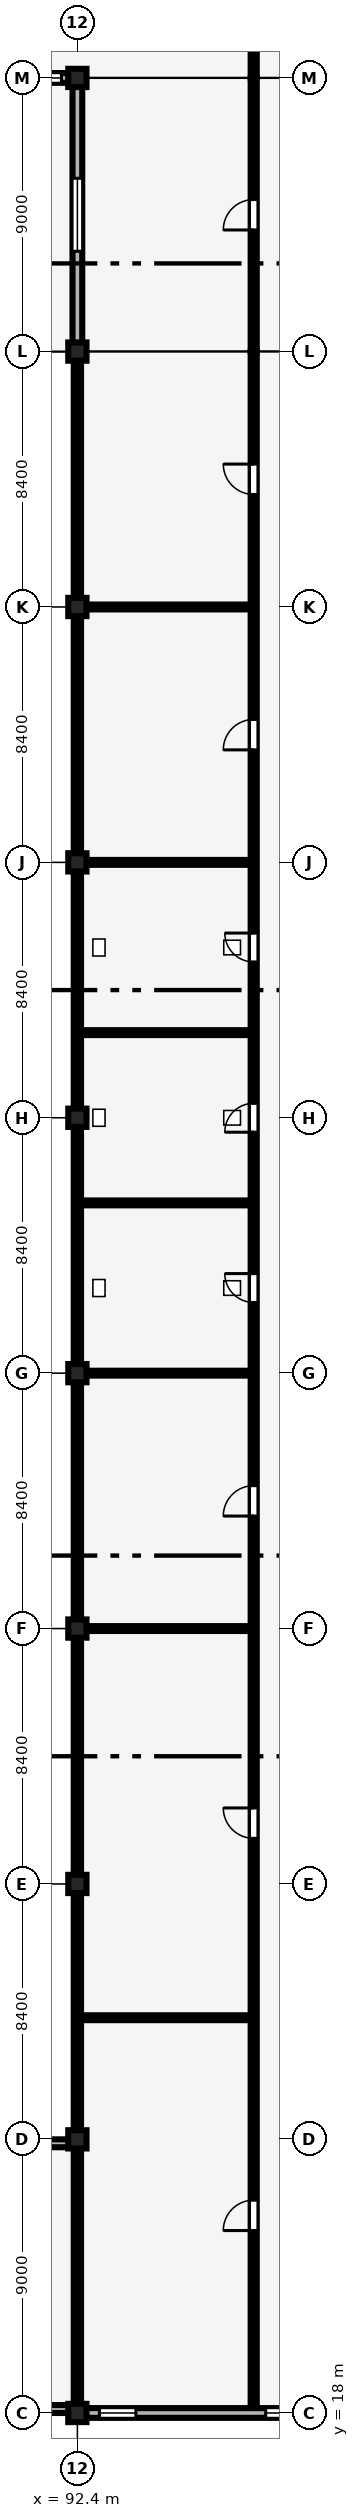
"""IFC4 building model, lengths in metres.
Left out: names, types, materials, properties, quantities, classifications, styles, units other than length and angle.
Written with IfcOpenShell. Run it as: python <this file> out.ifc"""

import sys

from ifc_helpers import new_model, si_unit, direction, frame, frame_2d, origin, origin_2d, place, context, subcontext, project, spatial, rectangle, extrude, element, fill, save


model = new_model("IFC4")
c1 = context("Model", 3, precision=1e-05, world=origin(), true_north=direction((0.0, 1.0)))
c2 = subcontext(c1, "Body", "Model", "MODEL_VIEW")
j1 = project(units=[si_unit("LENGTHUNIT", "METRE"), si_unit("PLANEANGLEUNIT", "RADIAN")], contexts=[c1])
p1 = place(None, origin())
s1 = spatial("IfcSite", under=j1, at=p1, CompositionType="ELEMENT")
p2 = place(p1, origin())
s2 = spatial("IfcBuilding", under=s1, at=p2, CompositionType="ELEMENT")
p3 = place(p2, frame((0.0, 0.0, 9.0)))
s3 = spatial("IfcBuildingStorey", under=s2, at=p3, CompositionType="ELEMENT", Elevation=9.0)
for number, where, z_axis, x_axis in (
    (1, (92.4, 18.0, 0.0), (0.0, 0.0, 1.0), (1.0, 0.0, 0.0)),
    (2, (92.4, 27.0, 0.0), (0.0, 0.0, 1.0), (1.0, 0.0, 0.0)),
    (3, (92.4, 35.4, 0.0), (0.0, 0.0, 1.0), (1.0, 0.0, 0.0)),
    (4, (92.4, 43.8, 0.0), (0.0, 0.0, 1.0), (1.0, 0.0, 0.0)),
    (5, (92.4, 52.2, 0.0), (0.0, 0.0, 1.0), (1.0, 0.0, 0.0)),
    (6, (92.4, 60.6, 0.0), (0.0, 0.0, 1.0), (1.0, 0.0, 0.0)),
    (7, (92.4, 69.0, 0.0), (0.0, 0.0, 1.0), (1.0, 0.0, 0.0)),
    (8, (92.4, 77.4, 0.0), (0.0, 0.0, 1.0), (1.0, 0.0, 0.0)),
    (9, (92.4, 85.8, 0.0), (0.0, 0.0, 1.0), (1.0, 0.0, 0.0)),
    (10, (92.4, 94.8, 0.0), (0.0, 0.0, 1.0), (1.0, 0.0, 0.0)),
):
    element("IfcColumn", number, at=place(p3, frame(where, z_axis=z_axis, x_axis=x_axis)), inside=s3, PredefinedType="COLUMN", context=c2, shape_type="SweptSolid", body=[
        extrude(rectangle(XDim=0.6, YDim=0.6, at=origin_2d()), origin(), (0.0, 0.0, 1.0), 4.2),
    ])
p4 = place(p3, frame((84.25, 94.8, 0.0), z_axis=(0.0, 0.0, 1.0), x_axis=(1.0, 0.0, 0.0)))
e11 = element("IfcWall", 11, at=p4, inside=s3, PredefinedType="SOLIDWALL", context=c2, shape_type="SweptSolid", body=[
    extrude(rectangle(XDim=7.875, YDim=0.32, at=frame_2d((3.938, 0.0))), origin(), (0.0, 0.0, 1.0), 3.31),
])
p5 = place(p4, frame((0.45, 0.0, 0.9)))
e12 = element("IfcOpeningElement", 12, at=p5, cuts=e11, PredefinedType="OPENING", context=c2, shape_type="SweptSolid", body=[
    extrude(rectangle(XDim=1.2, YDim=1.8, at=frame_2d((0.6, 0.9))), frame((0.0, 0.17, 0.0), z_axis=(0.0, -1.0, 0.0), x_axis=(1.0, 0.0, 0.0)), (0.0, 0.0, 1.0), 0.34),
])
p6 = place(p4, frame((5.945, 0.0, 0.9)))
e13 = element("IfcOpeningElement", 13, at=p6, cuts=e11, PredefinedType="OPENING", context=c2, shape_type="SweptSolid", body=[
    extrude(rectangle(XDim=1.68, YDim=2.26, at=frame_2d((0.84, 1.13))), frame((0.0, 0.17, 0.0), z_axis=(0.0, -1.0, 0.0), x_axis=(1.0, 0.0, 0.0)), (0.0, 0.0, 1.0), 0.34),
])
p7 = place(p3, frame((92.4, 86.075, 0.0), z_axis=(0.0, 0.0, 1.0), x_axis=(0.0, 1.0, 0.0)))
e14 = element("IfcWall", 14, at=p7, inside=s3, PredefinedType="SOLIDWALL", context=c2, shape_type="SweptSolid", body=[
    extrude(rectangle(XDim=8.45, YDim=0.32, at=frame_2d((4.225, 0.0))), origin(), (0.0, 0.0, 1.0), 3.29),
])
p8 = place(p7, frame((3.025, 0.0, 0.9)))
e15 = element("IfcOpeningElement", 15, at=p8, cuts=e14, PredefinedType="OPENING", context=c2, shape_type="SweptSolid", body=[
    extrude(rectangle(XDim=2.4, YDim=1.8, at=frame_2d((1.2, 0.9))), frame((0.0, 0.17, 0.0), z_axis=(0.0, -1.0, 0.0), x_axis=(1.0, 0.0, 0.0)), (0.0, 0.0, 1.0), 0.34),
])
p9 = place(p3, frame((92.4, 18.275, 0.0), z_axis=(0.0, 0.0, 1.0), x_axis=(0.0, 1.0, 0.0)))
e16 = element("IfcWall", 16, at=p9, inside=s3, PredefinedType="SOLIDWALL", context=c2, shape_type="SweptSolid", body=[
    extrude(rectangle(XDim=8.45, YDim=0.24, at=frame_2d((4.225, 0.0))), origin(), (0.0, 0.0, 1.0), 1.15),
])
p10 = place(p3, frame((92.4, 27.275, 0.0), z_axis=(0.0, 0.0, 1.0), x_axis=(0.0, 1.0, 0.0)))
e17 = element("IfcWall", 17, at=p10, inside=s3, PredefinedType="SOLIDWALL", context=c2, shape_type="SweptSolid", body=[
    extrude(rectangle(XDim=7.85, YDim=0.24, at=frame_2d((3.925, 0.0))), origin(), (0.0, 0.0, 1.0), 1.15),
])
p11 = place(p3, frame((92.4, 35.675, 0.0), z_axis=(0.0, 0.0, 1.0), x_axis=(0.0, 1.0, 0.0)))
e18 = element("IfcWall", 18, at=p11, inside=s3, PredefinedType="SOLIDWALL", context=c2, shape_type="SweptSolid", body=[
    extrude(rectangle(XDim=7.85, YDim=0.24, at=frame_2d((3.925, 0.0))), origin(), (0.0, 0.0, 1.0), 1.15),
])
p12 = place(p3, frame((92.4, 44.075, 0.0), z_axis=(0.0, 0.0, 1.0), x_axis=(0.0, 1.0, 0.0)))
e19 = element("IfcWall", 19, at=p12, inside=s3, PredefinedType="SOLIDWALL", context=c2, shape_type="SweptSolid", body=[
    extrude(rectangle(XDim=7.85, YDim=0.24, at=frame_2d((3.925, 0.0))), origin(), (0.0, 0.0, 1.0), 1.15),
])
p13 = place(p3, frame((92.4, 52.475, 0.0), z_axis=(0.0, 0.0, 1.0), x_axis=(0.0, 1.0, 0.0)))
e20 = element("IfcWall", 20, at=p13, inside=s3, PredefinedType="SOLIDWALL", context=c2, shape_type="SweptSolid", body=[
    extrude(rectangle(XDim=7.85, YDim=0.24, at=frame_2d((3.925, 0.0))), origin(), (0.0, 0.0, 1.0), 1.15),
])
for number, where, z_axis, x_axis in (
    (21, (92.4, 60.875, 0.0), (0.0, 0.0, 1.0), (0.0, 1.0, 0.0)),
    (22, (92.4, 69.275, 0.0), (0.0, 0.0, 1.0), (0.0, 1.0, 0.0)),
):
    element("IfcWall", number, at=place(p3, frame(where, z_axis=z_axis, x_axis=x_axis)), inside=s3, PredefinedType="SOLIDWALL", context=c2, shape_type="SweptSolid", body=[
        extrude(rectangle(XDim=7.85, YDim=0.24, at=frame_2d((3.925, 0.0))), origin(), (0.0, 0.0, 1.0), 1.15),
    ])
p14 = place(p3, frame((92.4, 77.675, 0.0), z_axis=(0.0, 0.0, 1.0), x_axis=(0.0, 1.0, 0.0)))
e23 = element("IfcWall", 23, at=p14, inside=s3, PredefinedType="SOLIDWALL", context=c2, shape_type="SweptSolid", body=[
    extrude(rectangle(XDim=7.85, YDim=0.24, at=frame_2d((3.925, 0.0))), origin(), (0.0, 0.0, 1.0), 1.15),
])
p15 = place(p3, frame((92.675, 18.0, 0.0), z_axis=(0.0, 0.0, 1.0), x_axis=(1.0, 0.0, 0.0)))
e24 = element("IfcWall", 24, at=p15, inside=s3, PredefinedType="SOLIDWALL", context=c2, shape_type="SweptSolid", body=[
    extrude(rectangle(XDim=7.85, YDim=0.32, at=frame_2d((3.925, 0.0))), origin(), (0.0, 0.0, 1.0), 3.18),
])
p16 = place(p15, frame((0.45, 0.0, 0.9)))
e25 = element("IfcOpeningElement", 25, at=p16, cuts=e24, PredefinedType="OPENING", context=c2, shape_type="SweptSolid", body=[
    extrude(rectangle(XDim=1.2, YDim=1.8, at=frame_2d((0.6, 0.9))), frame((0.0, 0.17, 0.0), z_axis=(0.0, -1.0, 0.0), x_axis=(1.0, 0.0, 0.0)), (0.0, 0.0, 1.0), 0.34),
])
p17 = place(p15, frame((5.92, 0.0, 0.9)))
e26 = element("IfcOpeningElement", 26, at=p17, cuts=e24, PredefinedType="OPENING", context=c2, shape_type="SweptSolid", body=[
    extrude(rectangle(XDim=1.68, YDim=2.13, at=frame_2d((0.84, 1.065))), frame((0.0, 0.17, 0.0), z_axis=(0.0, -1.0, 0.0), x_axis=(1.0, 0.0, 0.0)), (0.0, 0.0, 1.0), 0.34),
])
for number, where, z_axis, x_axis in (
    (27, (67.33, 18.13, 0.0), (0.0, 0.0, 1.0), (1.0, 0.0, 0.0)),
    (28, (67.33, 26.87, 0.0), (0.0, 0.0, 1.0), (1.0, 0.0, 0.0)),
):
    element("IfcWall", number, at=place(p3, frame(where, z_axis=z_axis, x_axis=x_axis)), inside=s3, PredefinedType="PARAPET", context=c2, shape_type="SweptSolid", body=[
        extrude(rectangle(XDim=24.94, YDim=0.26, at=frame_2d((12.47, 0.0))), origin(), (0.0, 0.0, 1.0), 0.85),
    ])
p18 = place(p3, frame((98.2, 94.81, 0.0), z_axis=(0.0, 0.0, 1.0), x_axis=(0.0, 1.0, 0.0)))
e29 = element("IfcWall", 29, at=p18, inside=s3, PredefinedType="PARTITIONING", context=c2, shape_type="SweptSolid", body=[
    extrude(rectangle(XDim=6.085, YDim=0.2, at=frame_2d((3.042, 0.0))), origin(), (0.0, 0.0, 1.0), 3.9),
])
p19 = place(p3, frame((98.2, 85.81, 0.0), z_axis=(0.0, 0.0, 1.0), x_axis=(0.0, 1.0, 0.0)))
e30 = element("IfcWall", 30, at=p19, inside=s3, PredefinedType="PARTITIONING", context=c2, shape_type="SweptSolid", body=[
    extrude(rectangle(XDim=8.98, YDim=0.2, at=frame_2d((4.49, 0.0))), origin(), (0.0, 0.0, 1.0), 3.9),
])
p20 = place(p19, frame((3.99, 0.0, 0.0)))
e31 = element("IfcOpeningElement", 31, at=p20, cuts=e30, PredefinedType="OPENING", context=c2, shape_type="SweptSolid", body=[
    extrude(rectangle(XDim=1.0, YDim=2.15, at=frame_2d((0.5, 1.075))), frame((0.0, 0.11, 0.0), z_axis=(0.0, -1.0, 0.0), x_axis=(1.0, 0.0, 0.0)), (0.0, 0.0, 1.0), 0.22),
])
p21 = place(p3, frame((92.525, 31.0, 0.0), z_axis=(0.0, 0.0, 1.0), x_axis=(1.0, 0.0, 0.0)))
e32 = element("IfcWall", 32, at=p21, inside=s3, PredefinedType="PARTITIONING", context=c2, shape_type="SweptSolid", body=[
    extrude(rectangle(XDim=5.57, YDim=0.16, at=frame_2d((2.785, 0.0))), origin(), (0.0, 0.0, 1.0), 3.9),
])
p22 = place(p3, frame((92.525, 43.8, 0.0), z_axis=(0.0, 0.0, 1.0), x_axis=(1.0, 0.0, 0.0)))
e33 = element("IfcWall", 33, at=p22, inside=s3, PredefinedType="PARTITIONING", context=c2, shape_type="SweptSolid", body=[
    extrude(rectangle(XDim=5.57, YDim=0.16, at=frame_2d((2.785, 0.0))), origin(), (0.0, 0.0, 1.0), 3.19),
])
p23 = place(p3, frame((92.525, 52.2, 0.0), z_axis=(0.0, 0.0, 1.0), x_axis=(1.0, 0.0, 0.0)))
e34 = element("IfcWall", 34, at=p23, inside=s3, PredefinedType="PARTITIONING", context=c2, shape_type="SweptSolid", body=[
    extrude(rectangle(XDim=5.57, YDim=0.16, at=frame_2d((2.785, 0.0))), origin(), (0.0, 0.0, 1.0), 2.99),
])
for number, where, z_axis, x_axis in (
    (35, (92.525, 57.8, 0.0), (0.0, 0.0, 1.0), (1.0, 0.0, 0.0)),
    (36, (92.525, 63.4, 0.0), (0.0, 0.0, 1.0), (1.0, 0.0, 0.0)),
):
    element("IfcWall", number, at=place(p3, frame(where, z_axis=z_axis, x_axis=x_axis)), inside=s3, PredefinedType="PARTITIONING", context=c2, shape_type="SweptSolid", body=[
        extrude(rectangle(XDim=5.57, YDim=0.16, at=frame_2d((2.785, 0.0))), origin(), (0.0, 0.0, 1.0), 3.46),
    ])
p24 = place(p3, frame((92.525, 69.0, 0.0), z_axis=(0.0, 0.0, 1.0), x_axis=(1.0, 0.0, 0.0)))
e37 = element("IfcWall", 37, at=p24, inside=s3, PredefinedType="PARTITIONING", context=c2, shape_type="SweptSolid", body=[
    extrude(rectangle(XDim=5.57, YDim=0.16, at=frame_2d((2.785, 0.0))), origin(), (0.0, 0.0, 1.0), 3.24),
])
p25 = place(p3, frame((92.525, 77.4, 0.0), z_axis=(0.0, 0.0, 1.0), x_axis=(1.0, 0.0, 0.0)))
e38 = element("IfcWall", 38, at=p25, inside=s3, PredefinedType="PARTITIONING", context=c2, shape_type="SweptSolid", body=[
    extrude(rectangle(XDim=5.57, YDim=0.16, at=frame_2d((2.785, 0.0))), origin(), (0.0, 0.0, 1.0), 3.09),
])
p26 = place(p3, frame((98.2, 18.165, 0.0), z_axis=(0.0, 0.0, 1.0), x_axis=(0.0, 1.0, 0.0)))
e39 = element("IfcWall", 39, at=p26, inside=s3, PredefinedType="PARTITIONING", context=c2, shape_type="SweptSolid", body=[
    extrude(rectangle(XDim=67.625, YDim=0.2, at=frame_2d((33.812, 0.0))), origin(), (0.0, 0.0, 1.0), 3.9),
])
p27 = place(p26, frame((5.835, 0.0, 0.0)))
e40 = element("IfcOpeningElement", 40, at=p27, cuts=e39, PredefinedType="OPENING", context=c2, shape_type="SweptSolid", body=[
    extrude(rectangle(XDim=1.0, YDim=2.15, at=frame_2d((0.5, 1.075))), frame((0.0, 0.11, 0.0), z_axis=(0.0, -1.0, 0.0), x_axis=(1.0, 0.0, 0.0)), (0.0, 0.0, 1.0), 0.22),
])
p28 = place(p26, frame((18.735, 0.0, 0.0)))
e41 = element("IfcOpeningElement", 41, at=p28, cuts=e39, PredefinedType="OPENING", context=c2, shape_type="SweptSolid", body=[
    extrude(rectangle(XDim=1.0, YDim=2.15, at=frame_2d((0.5, 1.075))), frame((0.0, 0.11, 0.0), z_axis=(0.0, -1.0, 0.0), x_axis=(1.0, 0.0, 0.0)), (0.0, 0.0, 1.0), 0.22),
])
p29 = place(p26, frame((29.335, 0.0, 0.0)))
e42 = element("IfcOpeningElement", 42, at=p29, cuts=e39, PredefinedType="OPENING", context=c2, shape_type="SweptSolid", body=[
    extrude(rectangle(XDim=1.0, YDim=2.15, at=frame_2d((0.5, 1.075))), frame((0.0, 0.11, 0.0), z_axis=(0.0, -1.0, 0.0), x_axis=(1.0, 0.0, 0.0)), (0.0, 0.0, 1.0), 0.22),
])
p30 = place(p26, frame((36.36, 0.0, 0.0)))
e43 = element("IfcOpeningElement", 43, at=p30, cuts=e39, PredefinedType="OPENING", context=c2, shape_type="SweptSolid", body=[
    extrude(rectangle(XDim=0.95, YDim=2.2, at=frame_2d((0.475, 1.1))), frame((0.0, 0.11, 0.0), z_axis=(0.0, -1.0, 0.0), x_axis=(1.0, 0.0, 0.0)), (0.0, 0.0, 1.0), 0.22),
])
p31 = place(p26, frame((41.96, 0.0, 0.0)))
e44 = element("IfcOpeningElement", 44, at=p31, cuts=e39, PredefinedType="OPENING", context=c2, shape_type="SweptSolid", body=[
    extrude(rectangle(XDim=0.95, YDim=2.2, at=frame_2d((0.475, 1.1))), frame((0.0, 0.11, 0.0), z_axis=(0.0, -1.0, 0.0), x_axis=(1.0, 0.0, 0.0)), (0.0, 0.0, 1.0), 0.22),
])
p32 = place(p26, frame((47.56, 0.0, 0.0)))
e45 = element("IfcOpeningElement", 45, at=p32, cuts=e39, PredefinedType="OPENING", context=c2, shape_type="SweptSolid", body=[
    extrude(rectangle(XDim=0.95, YDim=2.1, at=frame_2d((0.475, 1.05))), frame((0.0, 0.11, 0.0), z_axis=(0.0, -1.0, 0.0), x_axis=(1.0, 0.0, 0.0)), (0.0, 0.0, 1.0), 0.22),
])
p33 = place(p26, frame((54.535, 0.0, 0.0)))
e46 = element("IfcOpeningElement", 46, at=p33, cuts=e39, PredefinedType="OPENING", context=c2, shape_type="SweptSolid", body=[
    extrude(rectangle(XDim=1.0, YDim=2.15, at=frame_2d((0.5, 1.075))), frame((0.0, 0.11, 0.0), z_axis=(0.0, -1.0, 0.0), x_axis=(1.0, 0.0, 0.0)), (0.0, 0.0, 1.0), 0.22),
])
p34 = place(p26, frame((62.935, 0.0, 0.0)))
e47 = element("IfcOpeningElement", 47, at=p34, cuts=e39, PredefinedType="OPENING", context=c2, shape_type="SweptSolid", body=[
    extrude(rectangle(XDim=1.0, YDim=2.15, at=frame_2d((0.5, 1.075))), frame((0.0, 0.11, 0.0), z_axis=(0.0, -1.0, 0.0), x_axis=(1.0, 0.0, 0.0)), (0.0, 0.0, 1.0), 0.22),
])
p35 = place(p6, origin())
e48 = element("IfcWindow", 48, at=p35, inside=s3, PartitioningType="SINGLE_PANEL", PredefinedType="WINDOW", context=c2, shape_type="SweptSolid", body=[
    extrude(rectangle(XDim=1.68, YDim=2.26, at=frame_2d((0.84, 1.13))), frame((0.0, 0.03, 0.0), z_axis=(0.0, -1.0, 0.0), x_axis=(1.0, 0.0, 0.0)), (0.0, 0.0, 1.0), 0.06),
])
fill(e13, e48)
p36 = place(p8, origin())
e49 = element("IfcWindow", 49, at=p36, inside=s3, PartitioningType="SINGLE_PANEL", PredefinedType="WINDOW", context=c2, shape_type="SweptSolid", body=[
    extrude(rectangle(XDim=2.4, YDim=1.8, at=frame_2d((1.2, 0.9))), frame((0.0, 0.03, 0.0), z_axis=(0.0, -1.0, 0.0), x_axis=(1.0, 0.0, 0.0)), (0.0, 0.0, 1.0), 0.06),
])
fill(e15, e49)
p37 = place(p16, origin())
e50 = element("IfcWindow", 50, at=p37, inside=s3, PartitioningType="SINGLE_PANEL", PredefinedType="WINDOW", context=c2, shape_type="SweptSolid", body=[
    extrude(rectangle(XDim=1.2, YDim=1.8, at=frame_2d((0.6, 0.9))), frame((0.0, 0.03, 0.0), z_axis=(0.0, -1.0, 0.0), x_axis=(1.0, 0.0, 0.0)), (0.0, 0.0, 1.0), 0.06),
])
fill(e25, e50)
p38 = place(p17, origin())
e51 = element("IfcWindow", 51, at=p38, inside=s3, PartitioningType="SINGLE_PANEL", PredefinedType="WINDOW", context=c2, shape_type="SweptSolid", body=[
    extrude(rectangle(XDim=1.68, YDim=2.13, at=frame_2d((0.84, 1.065))), frame((0.0, 0.03, 0.0), z_axis=(0.0, -1.0, 0.0), x_axis=(1.0, 0.0, 0.0)), (0.0, 0.0, 1.0), 0.06),
])
fill(e26, e51)
p39 = place(p20, origin())
e52 = element("IfcDoor", 52, at=p39, inside=s3, OperationType="SINGLE_SWING_LEFT", PredefinedType="DOOR", context=c2, shape_type="SweptSolid", body=[
    extrude(rectangle(XDim=1.0, YDim=2.15, at=frame_2d((0.5, 1.075))), frame((0.0, 0.025, 0.0), z_axis=(0.0, -1.0, 0.0), x_axis=(1.0, 0.0, 0.0)), (0.0, 0.0, 1.0), 0.05),
])
fill(e31, e52)
p40 = place(p27, origin())
e53 = element("IfcDoor", 53, at=p40, inside=s3, OperationType="SINGLE_SWING_LEFT", PredefinedType="DOOR", context=c2, shape_type="SweptSolid", body=[
    extrude(rectangle(XDim=1.0, YDim=2.15, at=frame_2d((0.5, 1.075))), frame((0.0, 0.025, 0.0), z_axis=(0.0, -1.0, 0.0), x_axis=(1.0, 0.0, 0.0)), (0.0, 0.0, 1.0), 0.05),
])
fill(e40, e53)
p41 = place(p28, origin())
e54 = element("IfcDoor", 54, at=p41, inside=s3, OperationType="SINGLE_SWING_RIGHT", PredefinedType="DOOR", context=c2, shape_type="SweptSolid", body=[
    extrude(rectangle(XDim=1.0, YDim=2.15, at=frame_2d((0.5, 1.075))), frame((0.0, 0.025, 0.0), z_axis=(0.0, -1.0, 0.0), x_axis=(1.0, 0.0, 0.0)), (0.0, 0.0, 1.0), 0.05),
])
fill(e41, e54)
p42 = place(p29, origin())
e55 = element("IfcDoor", 55, at=p42, inside=s3, OperationType="SINGLE_SWING_LEFT", PredefinedType="DOOR", context=c2, shape_type="SweptSolid", body=[
    extrude(rectangle(XDim=1.0, YDim=2.15, at=frame_2d((0.5, 1.075))), frame((0.0, 0.025, 0.0), z_axis=(0.0, -1.0, 0.0), x_axis=(1.0, 0.0, 0.0)), (0.0, 0.0, 1.0), 0.05),
])
fill(e42, e55)
p43 = place(p30, origin())
e56 = element("IfcDoor", 56, at=p43, inside=s3, OperationType="SINGLE_SWING_RIGHT", PredefinedType="DOOR", context=c2, shape_type="SweptSolid", body=[
    extrude(rectangle(XDim=0.95, YDim=2.2, at=frame_2d((0.475, 1.1))), frame((0.0, 0.025, 0.0), z_axis=(0.0, -1.0, 0.0), x_axis=(1.0, 0.0, 0.0)), (0.0, 0.0, 1.0), 0.05),
])
fill(e43, e56)
p44 = place(p31, origin())
e57 = element("IfcDoor", 57, at=p44, inside=s3, OperationType="SINGLE_SWING_LEFT", PredefinedType="DOOR", context=c2, shape_type="SweptSolid", body=[
    extrude(rectangle(XDim=0.95, YDim=2.2, at=frame_2d((0.475, 1.1))), frame((0.0, 0.025, 0.0), z_axis=(0.0, -1.0, 0.0), x_axis=(1.0, 0.0, 0.0)), (0.0, 0.0, 1.0), 0.05),
])
fill(e44, e57)
p45 = place(p32, origin())
e58 = element("IfcDoor", 58, at=p45, inside=s3, OperationType="SINGLE_SWING_RIGHT", PredefinedType="DOOR", context=c2, shape_type="SweptSolid", body=[
    extrude(rectangle(XDim=0.95, YDim=2.1, at=frame_2d((0.475, 1.05))), frame((0.0, 0.025, 0.0), z_axis=(0.0, -1.0, 0.0), x_axis=(1.0, 0.0, 0.0)), (0.0, 0.0, 1.0), 0.05),
])
fill(e45, e58)
p46 = place(p33, origin())
e59 = element("IfcDoor", 59, at=p46, inside=s3, OperationType="SINGLE_SWING_LEFT", PredefinedType="DOOR", context=c2, shape_type="SweptSolid", body=[
    extrude(rectangle(XDim=1.0, YDim=2.15, at=frame_2d((0.5, 1.075))), frame((0.0, 0.025, 0.0), z_axis=(0.0, -1.0, 0.0), x_axis=(1.0, 0.0, 0.0)), (0.0, 0.0, 1.0), 0.05),
])
fill(e46, e59)
p47 = place(p34, origin())
e60 = element("IfcDoor", 60, at=p47, inside=s3, OperationType="SINGLE_SWING_RIGHT", PredefinedType="DOOR", context=c2, shape_type="SweptSolid", body=[
    extrude(rectangle(XDim=1.0, YDim=2.15, at=frame_2d((0.5, 1.075))), frame((0.0, 0.025, 0.0), z_axis=(0.0, -1.0, 0.0), x_axis=(1.0, 0.0, 0.0)), (0.0, 0.0, 1.0), 0.05),
])
fill(e47, e60)
save(model, sys.argv[1])
